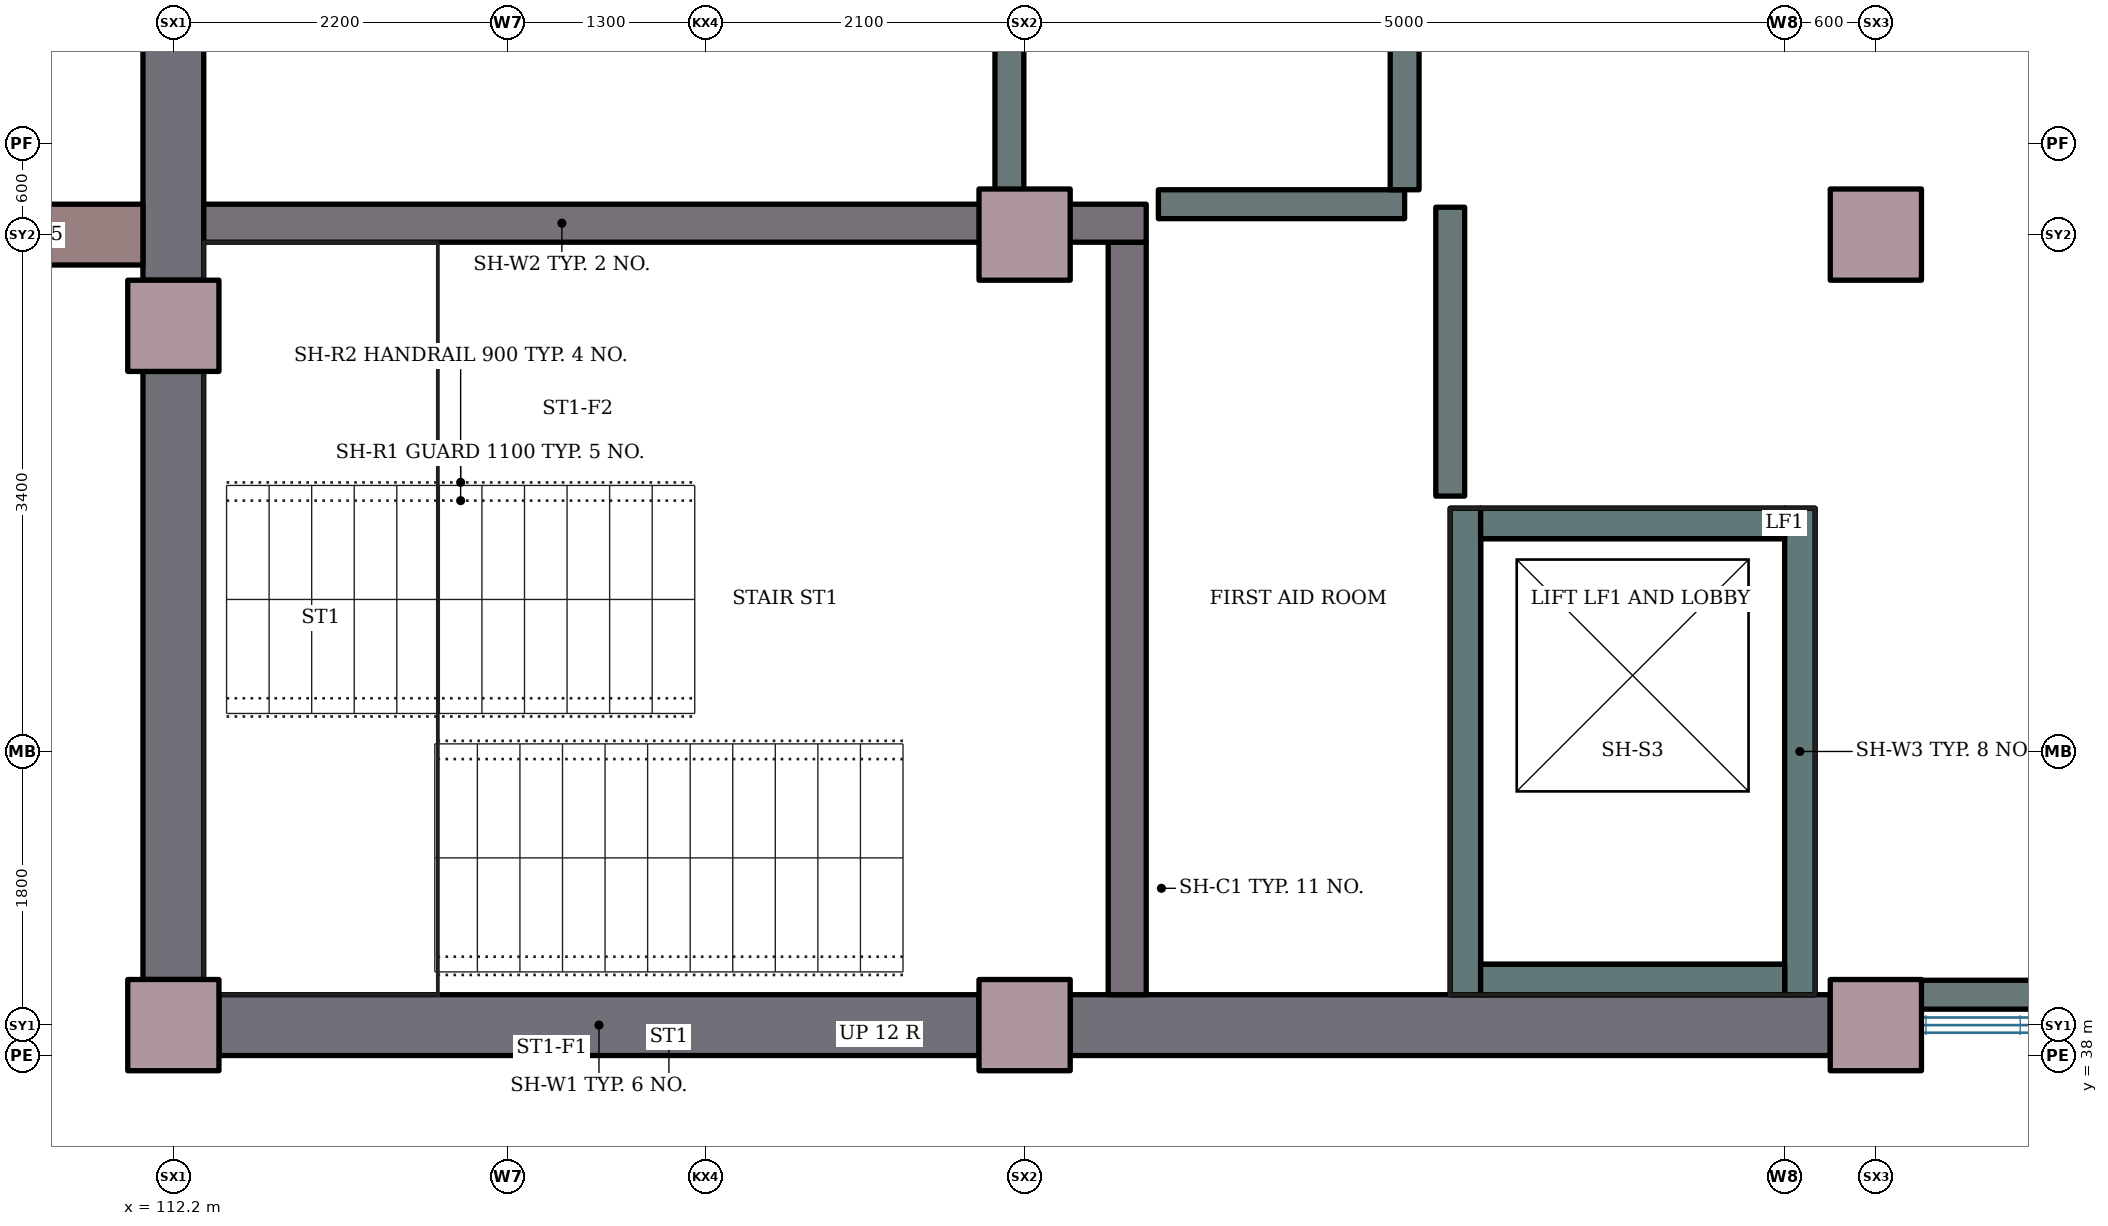
"""IFC4 building model, lengths in metres.
Left out: names, types, materials, properties, quantities, classifications, styles, units other than length and angle.
Written with IfcOpenShell. Run it as: python <this file> out.ifc"""

import sys

from ifc_helpers import new_model, si_unit, direction, frame, frame_2d, origin, origin_2d, place, context, subcontext, project, spatial, rectangle, extrude, element, fill, save


model = new_model("IFC4")
c1 = context("Model", 3, precision=1e-05, world=origin(), true_north=direction((0.0, 1.0)))
c2 = subcontext(c1, "Body", "Model", "MODEL_VIEW")
j1 = project(units=[si_unit("LENGTHUNIT", "METRE"), si_unit("PLANEANGLEUNIT", "RADIAN")], contexts=[c1])
p1 = place(None, origin())
s1 = spatial("IfcSite", under=j1, at=p1, CompositionType="ELEMENT")
p2 = place(p1, origin())
s2 = spatial("IfcBuilding", under=s1, at=p2, CompositionType="ELEMENT")
p3 = place(p2, origin())
s3 = spatial("IfcBuildingStorey", under=s2, at=p3, CompositionType="ELEMENT", Elevation=0.0)
for number, where, z_axis, x_axis in (
    (1, (112.2, 38.2, 0.0), (0.0, 0.0, 1.0), (1.0, 0.0, 0.0)),
    (2, (117.8, 38.2, 0.0), (0.0, 0.0, 1.0), (1.0, 0.0, 0.0)),
    (3, (123.4, 38.2, 0.0), (0.0, 0.0, 1.0), (1.0, 0.0, 0.0)),
    (4, (112.2, 42.8, 0.0), (0.0, 0.0, 1.0), (1.0, 0.0, 0.0)),
    (5, (117.8, 43.4, 0.0), (0.0, 0.0, 1.0), (1.0, 0.0, 0.0)),
    (6, (123.4, 43.4, 0.0), (0.0, 0.0, 1.0), (1.0, 0.0, 0.0)),
):
    element("IfcColumn", number, at=place(p3, frame(where, z_axis=z_axis, x_axis=x_axis)), inside=s3, PredefinedType="COLUMN", context=c2, shape_type="SweptSolid", body=[
        extrude(rectangle(XDim=0.6, YDim=0.6, at=origin_2d()), origin(), (0.0, 0.0, 1.0), 4.2),
    ])
p4 = place(p3, frame((117.5, 38.2, 0.0), z_axis=(0.0, 0.0, 1.0), x_axis=(-1.0, 0.0, 0.0)))
e7 = element("IfcWall", 7, at=p4, inside=s3, PredefinedType="SOLIDWALL", context=c2, shape_type="SweptSolid", body=[
    extrude(rectangle(XDim=5.0, YDim=0.4, at=frame_2d((2.5, 0.0))), origin(), (0.0, 0.0, 1.0), 4.2),
])
p5 = place(p4, frame((3.85, 0.0, 0.0)))
e8 = element("IfcOpeningElement", 8, at=p5, cuts=e7, PredefinedType="OPENING", context=c2, shape_type="SweptSolid", body=[
    extrude(rectangle(XDim=1.0, YDim=2.4, at=frame_2d((0.5, 1.2))), frame((0.0, 0.21, 0.0), z_axis=(0.0, -1.0, 0.0), x_axis=(1.0, 0.0, 0.0)), (0.0, 0.0, 1.0), 0.42),
])
p6 = place(p3, frame((123.1, 38.2, 0.0), z_axis=(0.0, 0.0, 1.0), x_axis=(-1.0, 0.0, 0.0)))
e9 = element("IfcWall", 9, at=p6, inside=s3, PredefinedType="SOLIDWALL", context=c2, shape_type="SweptSolid", body=[
    extrude(rectangle(XDim=5.0, YDim=0.4, at=frame_2d((2.5, 0.0))), origin(), (0.0, 0.0, 1.0), 4.2),
])
p7 = place(p6, frame((3.45, 0.0, 1.0)))
e10 = element("IfcOpeningElement", 10, at=p7, cuts=e9, PredefinedType="OPENING", context=c2, shape_type="SweptSolid", body=[
    extrude(rectangle(XDim=1.0, YDim=1.2, at=frame_2d((0.5, 0.6))), frame((0.0, 0.21, 0.0), z_axis=(0.0, -1.0, 0.0), x_axis=(1.0, 0.0, 0.0)), (0.0, 0.0, 1.0), 0.42),
])
p8 = place(p3, frame((112.2, 38.5, 0.0), z_axis=(0.0, 0.0, 1.0), x_axis=(0.0, 1.0, 0.0)))
e11 = element("IfcWall", 11, at=p8, inside=s3, PredefinedType="SOLIDWALL", context=c2, shape_type="SweptSolid", body=[
    extrude(rectangle(XDim=4.0, YDim=0.4, at=frame_2d((2.0, 0.0))), origin(), (0.0, 0.0, 1.0), 4.2),
])
p9 = place(p8, frame((1.55, 0.0, 0.9)))
e12 = element("IfcOpeningElement", 12, at=p9, cuts=e11, PredefinedType="OPENING", context=c2, shape_type="SweptSolid", body=[
    extrude(rectangle(XDim=0.9, YDim=1.5, at=frame_2d((0.45, 0.75))), frame((0.0, 0.21, 0.0), z_axis=(0.0, -1.0, 0.0), x_axis=(1.0, 0.0, 0.0)), (0.0, 0.0, 1.0), 0.42),
])
p10 = place(p3, frame((112.2, 43.1, 0.0), z_axis=(0.0, 0.0, 1.0), x_axis=(0.0, 1.0, 0.0)))
e13 = element("IfcWall", 13, at=p10, inside=s3, PredefinedType="SOLIDWALL", context=c2, shape_type="SweptSolid", body=[
    extrude(rectangle(XDim=4.0, YDim=0.4, at=frame_2d((2.0, 0.0))), origin(), (0.0, 0.0, 1.0), 4.2),
])
p11 = place(p10, frame((1.4, 0.0, 1.2)))
e14 = element("IfcOpeningElement", 14, at=p11, cuts=e13, PredefinedType="OPENING", context=c2, shape_type="SweptSolid", body=[
    extrude(rectangle(XDim=1.2, YDim=1.8, at=frame_2d((0.6, 0.9))), frame((0.0, 0.21, 0.0), z_axis=(0.0, -1.0, 0.0), x_axis=(1.0, 0.0, 0.0)), (0.0, 0.0, 1.0), 0.42),
])
p12 = place(p3, frame((118.475, 38.4, 0.0), z_axis=(0.0, 0.0, 1.0), x_axis=(0.0, 1.0, 0.0)))
e15 = element("IfcWall", 15, at=p12, inside=s3, PredefinedType="SHEAR", context=c2, shape_type="SweptSolid", body=[
    extrude(rectangle(XDim=4.95, YDim=0.25, at=frame_2d((2.475, 0.0))), origin(), (0.0, 0.0, 1.0), 4.2),
])
p13 = place(p3, frame((112.4, 43.475, 0.0), z_axis=(0.0, 0.0, 1.0), x_axis=(1.0, 0.0, 0.0)))
e16 = element("IfcWall", 16, at=p13, inside=s3, PredefinedType="SHEAR", context=c2, shape_type="SweptSolid", body=[
    extrude(rectangle(XDim=6.2, YDim=0.25, at=frame_2d((3.1, 0.0))), origin(), (0.0, 0.0, 1.0), 4.2),
])
p14 = place(p13, frame((3.714, 0.0, 0.0)))
e17 = element("IfcOpeningElement", 17, at=p14, cuts=e16, PredefinedType="OPENING", context=c2, shape_type="SweptSolid", body=[
    extrude(rectangle(XDim=1.0, YDim=2.1, at=frame_2d((0.5, 1.05))), frame((0.0, 0.135, 0.0), z_axis=(0.0, -1.0, 0.0), x_axis=(1.0, 0.0, 0.0)), (0.0, 0.0, 1.0), 0.27),
])
for number, where, z_axis, x_axis in (
    (18, (120.7, 38.4, 0.0), (0.0, 0.0, 1.0), (0.0, 1.0, 0.0)),
    (19, (122.9, 38.4, 0.0), (0.0, 0.0, 1.0), (0.0, 1.0, 0.0)),
):
    element("IfcWall", number, at=place(p3, frame(where, z_axis=z_axis, x_axis=x_axis)), inside=s3, PredefinedType="SHEAR", context=c2, shape_type="SweptSolid", body=[
        extrude(rectangle(XDim=3.2, YDim=0.2, at=frame_2d((1.6, 0.0))), origin(), (0.0, 0.0, 1.0), 4.2),
    ])
p15 = place(p3, frame((120.8, 38.5, 0.0), z_axis=(0.0, 0.0, 1.0), x_axis=(1.0, 0.0, 0.0)))
e20 = element("IfcWall", 20, at=p15, inside=s3, PredefinedType="SHEAR", context=c2, shape_type="SweptSolid", body=[
    extrude(rectangle(XDim=2.0, YDim=0.2, at=frame_2d((1.0, 0.0))), origin(), (0.0, 0.0, 1.0), 4.2),
])
p16 = place(p3, frame((120.8, 41.5, 0.0), z_axis=(0.0, 0.0, 1.0), x_axis=(1.0, 0.0, 0.0)))
e21 = element("IfcWall", 21, at=p16, inside=s3, PredefinedType="SHEAR", context=c2, shape_type="SweptSolid", body=[
    extrude(rectangle(XDim=2.0, YDim=0.2, at=frame_2d((1.0, 0.0))), origin(), (0.0, 0.0, 1.0), 4.2),
])
p17 = place(p16, frame((0.45, 0.0, 0.0)))
e22 = element("IfcOpeningElement", 22, at=p17, cuts=e21, PredefinedType="OPENING", context=c2, shape_type="SweptSolid", body=[
    extrude(rectangle(XDim=1.1, YDim=2.1, at=frame_2d((0.55, 1.05))), frame((0.0, 0.11, 0.0), z_axis=(0.0, -1.0, 0.0), x_axis=(1.0, 0.0, 0.0)), (0.0, 0.0, 1.0), 0.22),
])
for number, where, z_axis, x_axis in (
    (23, (120.7, 38.4, -1.4), (0.0, 0.0, 1.0), (0.0, 1.0, 0.0)),
    (24, (122.9, 38.4, -1.4), (0.0, 0.0, 1.0), (0.0, 1.0, 0.0)),
):
    element("IfcWall", number, at=place(p3, frame(where, z_axis=z_axis, x_axis=x_axis)), inside=s3, PredefinedType="SHEAR", context=c2, shape_type="SweptSolid", body=[
        extrude(rectangle(XDim=3.2, YDim=0.2, at=frame_2d((1.6, 0.0))), origin(), (0.0, 0.0, 1.0), 1.4),
    ])
for number, where, z_axis, x_axis in (
    (25, (120.8, 38.5, -1.4), (0.0, 0.0, 1.0), (1.0, 0.0, 0.0)),
    (26, (120.8, 41.5, -1.4), (0.0, 0.0, 1.0), (1.0, 0.0, 0.0)),
):
    element("IfcWall", number, at=place(p3, frame(where, z_axis=z_axis, x_axis=x_axis)), inside=s3, PredefinedType="SHEAR", context=c2, shape_type="SweptSolid", body=[
        extrude(rectangle(XDim=2.0, YDim=0.2, at=frame_2d((1.0, 0.0))), origin(), (0.0, 0.0, 1.0), 1.4),
    ])
p18 = place(p3, frame((110.3, 43.4, 0.0), z_axis=(0.0, 0.0, 1.0), x_axis=(1.0, 0.0, 0.0)))
e27 = element("IfcWall", 27, at=p18, inside=s3, PredefinedType="STANDARD", context=c2, shape_type="SweptSolid", body=[
    extrude(rectangle(XDim=1.7, YDim=0.4, at=frame_2d((0.85, 0.0))), origin(), (0.0, 0.0, 1.0), 4.2),
])
for number, where, z_axis, x_axis in (
    (28, (112.4, 43.02, 0.0), (0.0, 0.0, 1.0), (0.0, -1.0, 0.0)),
    (29, (117.58, 38.4, 0.0), (0.0, 0.0, 1.0), (1.0, 0.0, 0.0)),
):
    element("IfcWall", number, at=place(p3, frame(where, z_axis=z_axis, x_axis=x_axis)), inside=s3, PredefinedType="PARTITIONING", context=c2, shape_type="SweptSolid", body=[
        extrude(rectangle(XDim=0.44, YDim=0.19, at=frame_2d((0.22, 0.0))), origin(), (0.0, 0.0, 1.0), 3.9),
    ])
p19 = place(p3, frame((117.7, 43.68, 0.0), z_axis=(0.0, 0.0, 1.0), x_axis=(0.0, 1.0, 0.0)))
e30 = element("IfcWall", 30, at=p19, inside=s3, PredefinedType="PARTITIONING", context=c2, shape_type="SweptSolid", body=[
    extrude(rectangle(XDim=2.92, YDim=0.19, at=frame_2d((1.46, 0.0))), origin(), (0.0, 0.0, 1.0), 3.9),
])
p20 = place(p3, frame((120.3, 43.6, 0.0), z_axis=(0.0, 0.0, 1.0), x_axis=(-1.0, 0.0, 0.0)))
e31 = element("IfcWall", 31, at=p20, inside=s3, PredefinedType="PARTITIONING", context=c2, shape_type="SweptSolid", body=[
    extrude(rectangle(XDim=1.62, YDim=0.19, at=frame_2d((0.81, 0.0))), origin(), (0.0, 0.0, 1.0), 3.9),
])
p21 = place(p3, frame((120.3, 43.695, 0.0), z_axis=(0.0, 0.0, 1.0), x_axis=(0.0, 1.0, 0.0)))
e32 = element("IfcWall", 32, at=p21, inside=s3, PredefinedType="PARTITIONING", context=c2, shape_type="SweptSolid", body=[
    extrude(rectangle(XDim=2.905, YDim=0.19, at=frame_2d((1.453, 0.0))), origin(), (0.0, 0.0, 1.0), 3.9),
])
p22 = place(p21, frame((0.955, 0.0, 0.0)))
e33 = element("IfcOpeningElement", 33, at=p22, cuts=e32, PredefinedType="OPENING", context=c2, shape_type="SweptSolid", body=[
    extrude(rectangle(XDim=0.9, YDim=2.1, at=frame_2d((0.45, 1.05))), frame((0.0, 0.105, 0.0), z_axis=(0.0, -1.0, 0.0), x_axis=(1.0, 0.0, 0.0)), (0.0, 0.0, 1.0), 0.21),
])
p23 = place(p3, frame((120.6, 41.68, 0.0), z_axis=(0.0, 0.0, 1.0), x_axis=(0.0, 1.0, 0.0)))
e34 = element("IfcWall", 34, at=p23, inside=s3, PredefinedType="PARTITIONING", context=c2, shape_type="SweptSolid", body=[
    extrude(rectangle(XDim=1.9, YDim=0.19, at=frame_2d((0.95, 0.0))), origin(), (0.0, 0.0, 1.0), 3.9),
])
p24 = place(p23, frame((0.47, 0.0, 0.0)))
e35 = element("IfcOpeningElement", 35, at=p24, cuts=e34, PredefinedType="OPENING", context=c2, shape_type="SweptSolid", body=[
    extrude(rectangle(XDim=1.0, YDim=2.1, at=frame_2d((0.5, 1.05))), frame((0.0, 0.105, 0.0), z_axis=(0.0, -1.0, 0.0), x_axis=(1.0, 0.0, 0.0)), (0.0, 0.0, 1.0), 0.21),
])
p25 = place(p3, frame((123.42, 38.4, 0.0), z_axis=(0.0, 0.0, 1.0), x_axis=(1.0, 0.0, 0.0)))
e36 = element("IfcWall", 36, at=p25, inside=s3, PredefinedType="PARTITIONING", context=c2, shape_type="SweptSolid", body=[
    extrude(rectangle(XDim=1.5, YDim=0.19, at=frame_2d((0.75, 0.0))), origin(), (0.0, 0.0, 1.0), 3.9),
])
p26 = place(p5, origin())
e37 = element("IfcDoor", 37, at=p26, inside=s3, OperationType="SINGLE_SWING_LEFT", PredefinedType="DOOR", context=c2, shape_type="SweptSolid", body=[
    extrude(rectangle(XDim=1.0, YDim=2.4, at=frame_2d((0.5, 1.2))), frame((0.0, 0.025, 0.0), z_axis=(0.0, -1.0, 0.0), x_axis=(1.0, 0.0, 0.0)), (0.0, 0.0, 1.0), 0.05),
])
fill(e8, e37)
p27 = place(p7, origin())
e38 = element("IfcWindow", 38, at=p27, inside=s3, PartitioningType="SINGLE_PANEL", PredefinedType="WINDOW", context=c2, shape_type="SweptSolid", body=[
    extrude(rectangle(XDim=1.0, YDim=1.2, at=frame_2d((0.5, 0.6))), frame((0.0, 0.03, 0.0), z_axis=(0.0, -1.0, 0.0), x_axis=(1.0, 0.0, 0.0)), (0.0, 0.0, 1.0), 0.06),
])
fill(e10, e38)
p28 = place(p9, origin())
e39 = element("IfcWindow", 39, at=p28, inside=s3, PartitioningType="SINGLE_PANEL", PredefinedType="WINDOW", context=c2, shape_type="SweptSolid", body=[
    extrude(rectangle(XDim=0.9, YDim=1.5, at=frame_2d((0.45, 0.75))), frame((0.0, 0.03, 0.0), z_axis=(0.0, -1.0, 0.0), x_axis=(1.0, 0.0, 0.0)), (0.0, 0.0, 1.0), 0.06),
])
fill(e12, e39)
p29 = place(p11, origin())
e40 = element("IfcWindow", 40, at=p29, inside=s3, PartitioningType="SINGLE_PANEL", PredefinedType="WINDOW", context=c2, shape_type="SweptSolid", body=[
    extrude(rectangle(XDim=1.2, YDim=1.8, at=frame_2d((0.6, 0.9))), frame((0.0, 0.03, 0.0), z_axis=(0.0, -1.0, 0.0), x_axis=(1.0, 0.0, 0.0)), (0.0, 0.0, 1.0), 0.06),
])
fill(e14, e40)
p30 = place(p17, origin())
e41 = element("IfcDoor", 41, at=p30, inside=s3, OperationType="SLIDING_TO_LEFT", PredefinedType="DOOR", context=c2, shape_type="SweptSolid", body=[
    extrude(rectangle(XDim=1.1, YDim=2.1, at=frame_2d((0.55, 1.05))), frame((0.0, 0.025, 0.0), z_axis=(0.0, -1.0, 0.0), x_axis=(1.0, 0.0, 0.0)), (0.0, 0.0, 1.0), 0.05),
])
fill(e22, e41)
p31 = place(p24, origin())
e42 = element("IfcDoor", 42, at=p31, inside=s3, OperationType="SINGLE_SWING_LEFT", PredefinedType="DOOR", context=c2, shape_type="SweptSolid", body=[
    extrude(rectangle(XDim=1.0, YDim=2.1, at=frame_2d((0.5, 1.05))), frame((0.0, 0.025, 0.0), z_axis=(0.0, -1.0, 0.0), x_axis=(1.0, 0.0, 0.0)), (0.0, 0.0, 1.0), 0.05),
])
fill(e35, e42)
p32 = place(p14, origin())
e43 = element("IfcDoor", 43, at=p32, inside=s3, OperationType="SINGLE_SWING_LEFT", PredefinedType="DOOR", context=c2, shape_type="SweptSolid", body=[
    extrude(rectangle(XDim=1.0, YDim=2.1, at=frame_2d((0.5, 1.05))), frame((0.0, 0.025, 0.0), z_axis=(0.0, -1.0, 0.0), x_axis=(1.0, 0.0, 0.0)), (0.0, 0.0, 1.0), 0.05),
])
fill(e17, e43)
save(model, sys.argv[1])
